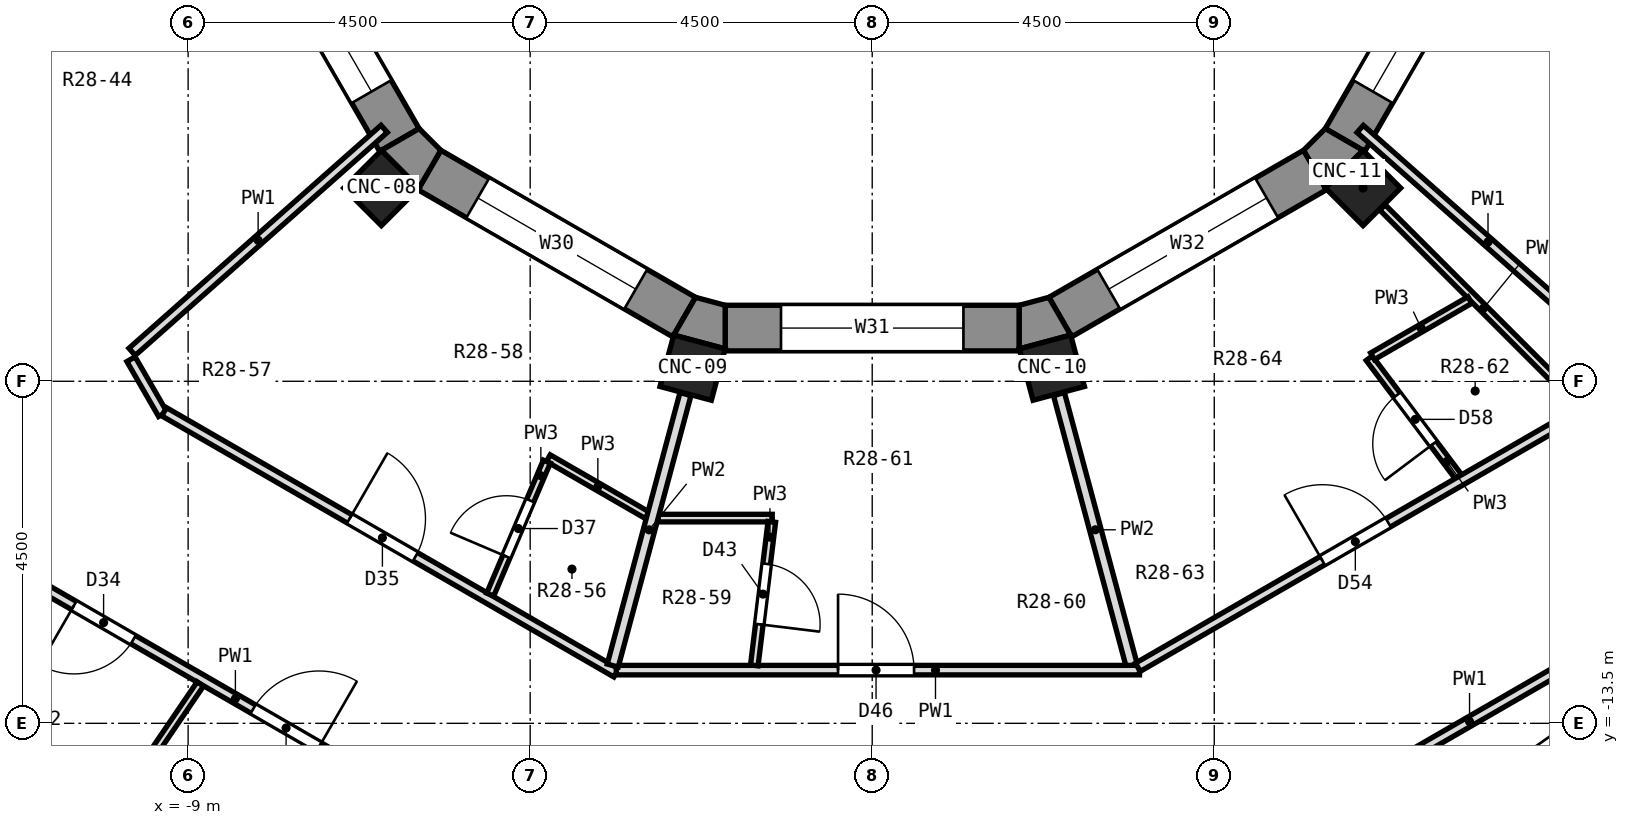
"""IFC4 building model, lengths in metres.
Left out: names, types, materials, properties, quantities, classifications, styles, units other than length and angle.
Written with IfcOpenShell. Run it as: python <this file> out.ifc"""

import sys

from ifc_helpers import new_model, si_unit, direction, frame, frame_2d, origin, origin_2d, place, context, subcontext, project, spatial, polyline, rectangle, outline, extrude, element, fill, save


model = new_model("IFC4")
c1 = context("Model", 3, precision=1e-05, world=origin(), true_north=direction((0.0, 1.0)))
c2 = subcontext(c1, "Body", "Model", "MODEL_VIEW")
j1 = project(units=[si_unit("LENGTHUNIT", "METRE"), si_unit("PLANEANGLEUNIT", "RADIAN")], contexts=[c1])
p1 = place(None, origin())
s1 = spatial("IfcSite", under=j1, at=p1, CompositionType="ELEMENT")
p2 = place(p1, origin())
s2 = spatial("IfcBuilding", under=s1, at=p2, CompositionType="ELEMENT")
p3 = place(p2, frame((0.0, 0.0, 190.5)))
s3 = spatial("IfcBuildingStorey", under=s2, at=p3, CompositionType="ELEMENT", Elevation=190.5)
for number, where, z_axis, x_axis in (
    (1, (-6.458, -6.458, 0.0), (0.0, 0.0, 1.0), (-0.707, -0.707, 0.0)),
    (2, (-2.364, -8.821, 0.0), (0.0, 0.0, 1.0), (-0.259, -0.966, 0.0)),
    (3, (2.364, -8.821, 0.0), (0.0, 0.0, 1.0), (0.259, -0.966, 0.0)),
    (4, (6.458, -6.458, 0.0), (0.0, 0.0, 1.0), (0.707, -0.707, 0.0)),
):
    element("IfcColumn", number, at=place(p3, frame(where, z_axis=z_axis, x_axis=x_axis)), inside=s3, PredefinedType="COLUMN", context=c2, shape_type="SweptSolid", body=[
        extrude(rectangle(XDim=0.7, YDim=0.7, at=origin_2d()), origin(), (0.0, 0.0, 1.0), 3.3),
    ])
p4 = place(p3, frame((-8.156, -2.474, 0.0), z_axis=(0.0, 0.0, 1.0), x_axis=(0.500033728941, -0.866005929495, 0.0)))
e5 = element("IfcWall", 5, at=p4, inside=s3, PredefinedType="SOLIDWALL", context=c2, shape_type="SweptSolid", body=[
    extrude(rectangle(XDim=3.87, YDim=0.6, at=frame_2d((1.935, 0.0))), origin(), (0.0, 0.0, 1.0), 2.85),
])
p5 = place(p4, frame((0.735, 0.0, 0.9)))
e6 = element("IfcOpeningElement", 6, at=p5, cuts=e5, PredefinedType="OPENING", context=c2, shape_type="SweptSolid", body=[
    extrude(rectangle(XDim=2.4, YDim=1.8, at=frame_2d((1.2, 0.9))), frame((0.0, 0.312, 0.0), z_axis=(0.0, -1.0, 0.0), x_axis=(1.0, 0.0, 0.0)), (0.0, 0.0, 1.0), 0.624),
])
p6 = place(p3, frame((-5.826, -6.22, 0.0), z_axis=(0.0, 0.0, 1.0), x_axis=(0.866005929495, -0.500033728941, 0.0)))
e7 = element("IfcWall", 7, at=p6, inside=s3, PredefinedType="SOLIDWALL", context=c2, shape_type="SweptSolid", body=[
    extrude(rectangle(XDim=3.87, YDim=0.6, at=frame_2d((1.935, 0.0))), origin(), (0.0, 0.0, 1.0), 2.85),
])
p7 = place(p6, frame((0.735, 0.0, 0.9)))
e8 = element("IfcOpeningElement", 8, at=p7, cuts=e7, PredefinedType="OPENING", context=c2, shape_type="SweptSolid", body=[
    extrude(rectangle(XDim=2.4, YDim=1.8, at=frame_2d((1.2, 0.9))), frame((0.0, 0.312, 0.0), z_axis=(0.0, -1.0, 0.0), x_axis=(1.0, 0.0, 0.0)), (0.0, 0.0, 1.0), 0.624),
])
p8 = place(p3, frame((-1.935, -8.3, 0.0), z_axis=(0.0, 0.0, 1.0), x_axis=(1.0, 0.0, 0.0)))
e9 = element("IfcWall", 9, at=p8, inside=s3, PredefinedType="SOLIDWALL", context=c2, shape_type="SweptSolid", body=[
    extrude(rectangle(XDim=3.87, YDim=0.6, at=frame_2d((1.935, 0.0))), origin(), (0.0, 0.0, 1.0), 2.85),
])
p9 = place(p8, frame((0.735, 0.0, 0.9)))
e10 = element("IfcOpeningElement", 10, at=p9, cuts=e9, PredefinedType="OPENING", context=c2, shape_type="SweptSolid", body=[
    extrude(rectangle(XDim=2.4, YDim=1.8, at=frame_2d((1.2, 0.9))), frame((0.0, 0.312, 0.0), z_axis=(0.0, -1.0, 0.0), x_axis=(1.0, 0.0, 0.0)), (0.0, 0.0, 1.0), 0.624),
])
p10 = place(p3, frame((2.474, -8.156, 0.0), z_axis=(0.0, 0.0, 1.0), x_axis=(0.866005929495, 0.500033728941, 0.0)))
e11 = element("IfcWall", 11, at=p10, inside=s3, PredefinedType="SOLIDWALL", context=c2, shape_type="SweptSolid", body=[
    extrude(rectangle(XDim=3.87, YDim=0.6, at=frame_2d((1.935, 0.0))), origin(), (0.0, 0.0, 1.0), 2.85),
])
p11 = place(p10, frame((0.735, 0.0, 0.9)))
e12 = element("IfcOpeningElement", 12, at=p11, cuts=e11, PredefinedType="OPENING", context=c2, shape_type="SweptSolid", body=[
    extrude(rectangle(XDim=2.4, YDim=1.8, at=frame_2d((1.2, 0.9))), frame((0.0, 0.312, 0.0), z_axis=(0.0, -1.0, 0.0), x_axis=(1.0, 0.0, 0.0)), (0.0, 0.0, 1.0), 0.624),
])
p12 = place(p3, frame((6.22, -5.826, 0.0), z_axis=(0.0, 0.0, 1.0), x_axis=(0.500033728941, 0.866005929495, 0.0)))
e13 = element("IfcWall", 13, at=p12, inside=s3, PredefinedType="SOLIDWALL", context=c2, shape_type="SweptSolid", body=[
    extrude(rectangle(XDim=3.87, YDim=0.6, at=frame_2d((1.935, 0.0))), origin(), (0.0, 0.0, 1.0), 2.85),
])
p13 = place(p12, frame((0.735, 0.0, 0.9)))
e14 = element("IfcOpeningElement", 14, at=p13, cuts=e13, PredefinedType="OPENING", context=c2, shape_type="SweptSolid", body=[
    extrude(rectangle(XDim=2.4, YDim=1.8, at=frame_2d((1.2, 0.9))), frame((0.0, 0.312, 0.0), z_axis=(0.0, -1.0, 0.0), x_axis=(1.0, 0.0, 0.0)), (0.0, 0.0, 1.0), 0.624),
])
p14 = place(p3, origin())
e15 = element("IfcWall", 15, at=p14, inside=s3, PredefinedType="SOLIDWALL", context=c2, shape_type="SweptSolid", body=[
    extrude(outline(polyline([(-6.458, -5.962), (-5.962, -6.458), (-5.676, -5.961), (-5.961, -5.676), (-6.458, -5.962)])), origin(), (0.0, 0.0, 1.0), 2.85),
])
p15 = place(p3, origin())
e16 = element("IfcWall", 16, at=p15, inside=s3, PredefinedType="SOLIDWALL", context=c2, shape_type="SweptSolid", body=[
    extrude(outline(polyline([(-1.935, -8.573), (-1.935, -8.0), (-2.324, -7.896), (-2.611, -8.392), (-1.935, -8.573)])), origin(), (0.0, 0.0, 1.0), 2.85),
])
p16 = place(p3, origin())
e17 = element("IfcWall", 17, at=p16, inside=s3, PredefinedType="SOLIDWALL", context=c2, shape_type="SweptSolid", body=[
    extrude(outline(polyline([(2.611, -8.392), (2.324, -7.896), (1.935, -8.0), (1.935, -8.573), (2.611, -8.392)])), origin(), (0.0, 0.0, 1.0), 2.85),
])
p17 = place(p3, origin())
e18 = element("IfcWall", 18, at=p17, inside=s3, PredefinedType="SOLIDWALL", context=c2, shape_type="SweptSolid", body=[
    extrude(outline(polyline([(5.962, -6.458), (6.458, -5.962), (5.961, -5.676), (5.676, -5.961), (5.962, -6.458)])), origin(), (0.0, 0.0, 1.0), 2.85),
])
p18 = place(p3, frame((2.457, -9.169, 0.0), z_axis=(0.0, 0.0, 1.0), x_axis=(0.258879127767, -0.965909725185, 0.0)))
e19 = element("IfcWall", 19, at=p18, inside=s3, PredefinedType="PARTITIONING", context=c2, shape_type="SweptSolid", body=[
    extrude(rectangle(XDim=3.697, YDim=0.15, at=frame_2d((1.848, 0.0))), origin(), (0.0, 0.0, 1.0), 2.85),
])
p19 = place(p3, frame((-9.752, -8.709, 0.0), z_axis=(0.0, 0.0, 1.0), x_axis=(0.500194796412, -0.865912908809, 0.0)))
e20 = element("IfcWall", 20, at=p19, inside=s3, PredefinedType="PARTITIONING", context=c2, shape_type="SweptSolid", body=[
    extrude(rectangle(XDim=0.835, YDim=0.125, at=frame_2d((0.417, 0.0))), origin(), (0.0, 0.0, 1.0), 2.85),
])
p20 = place(p3, frame((6.539, -8.696, 0.0), z_axis=(0.0, 0.0, 1.0), x_axis=(0.601120334692, -0.799158521959, 0.0)))
e21 = element("IfcWall", 21, at=p20, inside=s3, PredefinedType="PARTITIONING", context=c2, shape_type="SweptSolid", body=[
    extrude(rectangle(XDim=1.951, YDim=0.1, at=frame_2d((0.976, 0.0))), origin(), (0.0, 0.0, 1.0), 2.85),
])
p21 = place(p20, frame((0.607, 0.0, 0.0)))
e22 = element("IfcOpeningElement", 22, at=p21, cuts=e21, PredefinedType="OPENING", context=c2, shape_type="SweptSolid", body=[
    extrude(rectangle(XDim=0.8, YDim=2.1, at=frame_2d((0.4, 1.05))), frame((0.0, 0.062, 0.0), z_axis=(0.0, -1.0, 0.0), x_axis=(1.0, 0.0, 0.0)), (0.0, 0.0, 1.0), 0.124),
])
p22 = place(p3, frame((6.712, -6.712, 0.0), z_axis=(0.0, 0.0, 1.0), x_axis=(0.707106781187, -0.707106781187, 0.0)))
e23 = element("IfcWall", 23, at=p22, inside=s3, PredefinedType="PARTITIONING", context=c2, shape_type="SweptSolid", body=[
    extrude(rectangle(XDim=3.759, YDim=0.1, at=frame_2d((1.88, 0.0))), origin(), (0.0, 0.0, 1.0), 2.85),
])
p23 = place(p3, frame((6.42, -5.68, 0.0), z_axis=(0.0, 0.0, 1.0), x_axis=(0.748958163245, -0.662617287511, 0.0)))
e24 = element("IfcWall", 24, at=p23, inside=s3, PredefinedType="PARTITIONING", context=c2, shape_type="SweptSolid", body=[
    extrude(rectangle(XDim=4.49, YDim=0.125, at=frame_2d((2.245, 0.0))), origin(), (0.0, 0.0, 1.0), 2.85),
])
p24 = place(p3, frame((-11.366, -11.451, 0.0), z_axis=(0.0, 0.0, 1.0), x_axis=(0.866032091518, -0.499988416326, 0.0)))
e25 = element("IfcWall", 25, at=p24, inside=s3, PredefinedType="PARTITIONING", context=c2, shape_type="SweptSolid", body=[
    extrude(rectangle(XDim=8.37, YDim=0.125, at=frame_2d((4.185, 0.0))), origin(), (0.0, 0.0, 1.0), 2.85),
])
p25 = place(p24, frame((0.998, 0.0, 0.0)))
e26 = element("IfcOpeningElement", 26, at=p25, cuts=e25, PredefinedType="OPENING", context=c2, shape_type="SweptSolid", body=[
    extrude(rectangle(XDim=0.9, YDim=2.1, at=frame_2d((0.45, 1.05))), frame((0.0, 0.074, 0.0), z_axis=(0.0, -1.0, 0.0), x_axis=(1.0, 0.0, 0.0)), (0.0, 0.0, 1.0), 0.149),
])
p26 = place(p24, frame((3.72, 0.0, 0.0)))
e27 = element("IfcOpeningElement", 27, at=p26, cuts=e25, PredefinedType="OPENING", context=c2, shape_type="SweptSolid", body=[
    extrude(rectangle(XDim=1.0, YDim=2.1, at=frame_2d((0.5, 1.05))), frame((0.0, 0.074, 0.0), z_axis=(0.0, -1.0, 0.0), x_axis=(1.0, 0.0, 0.0)), (0.0, 0.0, 1.0), 0.149),
])
p27 = place(p3, frame((-9.316, -9.401, 0.0), z_axis=(0.0, 0.0, 1.0), x_axis=(0.865996765544, -0.500049599607, 0.0)))
e28 = element("IfcWall", 28, at=p27, inside=s3, PredefinedType="PARTITIONING", context=c2, shape_type="SweptSolid", body=[
    extrude(rectangle(XDim=6.869, YDim=0.125, at=frame_2d((3.435, 0.0))), origin(), (0.0, 0.0, 1.0), 2.85),
])
p28 = place(p27, frame((2.816, 0.0, 0.0)))
e29 = element("IfcOpeningElement", 29, at=p28, cuts=e28, PredefinedType="OPENING", context=c2, shape_type="SweptSolid", body=[
    extrude(rectangle(XDim=1.0, YDim=2.1, at=frame_2d((0.5, 1.05))), frame((0.0, 0.074, 0.0), z_axis=(0.0, -1.0, 0.0), x_axis=(1.0, 0.0, 0.0)), (0.0, 0.0, 1.0), 0.149),
])
p29 = place(p3, frame((-4.261, -10.011, 0.0), z_axis=(0.0, 0.0, 1.0), x_axis=(0.86609634961, -0.499877098087, 0.0)))
e30 = element("IfcWall", 30, at=p29, inside=s3, PredefinedType="PARTITIONING", context=c2, shape_type="SweptSolid", body=[
    extrude(rectangle(XDim=1.503, YDim=0.1, at=frame_2d((0.752, 0.0))), origin(), (0.0, 0.0, 1.0), 2.85),
])
p30 = place(p3, frame((-3.367, -12.8, 0.0), z_axis=(0.0, 0.0, 1.0), x_axis=(1.0, 0.0, 0.0)))
e31 = element("IfcWall", 31, at=p30, inside=s3, PredefinedType="PARTITIONING", context=c2, shape_type="SweptSolid", body=[
    extrude(rectangle(XDim=6.884, YDim=0.125, at=frame_2d((3.442, 0.0))), origin(), (0.0, 0.0, 1.0), 2.85),
])
p31 = place(p30, frame((2.918, 0.0, 0.0)))
e32 = element("IfcOpeningElement", 32, at=p31, cuts=e31, PredefinedType="OPENING", context=c2, shape_type="SweptSolid", body=[
    extrude(rectangle(XDim=1.0, YDim=2.1, at=frame_2d((0.5, 1.05))), frame((0.0, 0.074, 0.0), z_axis=(0.0, -1.0, 0.0), x_axis=(1.0, 0.0, 0.0)), (0.0, 0.0, 1.0), 0.149),
])
p32 = place(p3, frame((-2.819, -10.8, 0.0), z_axis=(0.0, 0.0, 1.0), x_axis=(1.0, 0.0, 0.0)))
e33 = element("IfcWall", 33, at=p32, inside=s3, PredefinedType="PARTITIONING", context=c2, shape_type="SweptSolid", body=[
    extrude(rectangle(XDim=1.504, YDim=0.1, at=frame_2d((0.752, 0.0))), origin(), (0.0, 0.0, 1.0), 2.85),
])
p33 = place(p3, frame((4.234, -15.569, 0.0), z_axis=(0.0, 0.0, 1.0), x_axis=(0.866024799292, 0.50000104701, 0.0)))
e34 = element("IfcWall", 34, at=p33, inside=s3, PredefinedType="PARTITIONING", context=c2, shape_type="SweptSolid", body=[
    extrude(rectangle(XDim=8.37, YDim=0.125, at=frame_2d((4.185, 0.0))), origin(), (0.0, 0.0, 1.0), 2.85),
])
p34 = place(p3, frame((3.495, -12.762, 0.0), z_axis=(0.0, 0.0, 1.0), x_axis=(0.865996609613, 0.500049869652, 0.0)))
e35 = element("IfcWall", 35, at=p34, inside=s3, PredefinedType="PARTITIONING", context=c2, shape_type="SweptSolid", body=[
    extrude(rectangle(XDim=6.734, YDim=0.125, at=frame_2d((3.367, 0.0))), origin(), (0.0, 0.0, 1.0), 2.85),
])
p35 = place(p34, frame((2.804, 0.0, 0.0)))
e36 = element("IfcOpeningElement", 36, at=p35, cuts=e35, PredefinedType="OPENING", context=c2, shape_type="SweptSolid", body=[
    extrude(rectangle(XDim=1.0, YDim=2.1, at=frame_2d((0.5, 1.05))), frame((0.0, 0.074, 0.0), z_axis=(0.0, -1.0, 0.0), x_axis=(1.0, 0.0, 0.0)), (0.0, 0.0, 1.0), 0.149),
])
p36 = place(p3, frame((6.582, -8.671, 0.0), z_axis=(0.0, 0.0, 1.0), x_axis=(0.86582534463, 0.500346352636, 0.0)))
e37 = element("IfcWall", 37, at=p36, inside=s3, PredefinedType="PARTITIONING", context=c2, shape_type="SweptSolid", body=[
    extrude(rectangle(XDim=1.479, YDim=0.1, at=frame_2d((0.74, 0.0))), origin(), (0.0, 0.0, 1.0), 2.85),
])
p37 = place(p3, frame((-9.737, -8.613, 0.0), z_axis=(0.0, 0.0, 1.0), x_axis=(0.748961830347, 0.662613142552, 0.0)))
e38 = element("IfcWall", 38, at=p37, inside=s3, PredefinedType="PARTITIONING", context=c2, shape_type="SweptSolid", body=[
    extrude(rectangle(XDim=4.428, YDim=0.125, at=frame_2d((2.214, 0.0))), origin(), (0.0, 0.0, 1.0), 2.85),
])
p38 = place(p3, frame((-10.754, -15.794, 0.0), z_axis=(0.0, 0.0, 1.0), x_axis=(0.562822277652, 0.826577935695, 0.0)))
e39 = element("IfcWall", 39, at=p38, inside=s3, PredefinedType="PARTITIONING", context=c2, shape_type="SweptSolid", body=[
    extrude(rectangle(XDim=3.402, YDim=0.1, at=frame_2d((1.701, 0.0))), origin(), (0.0, 0.0, 1.0), 2.85),
])
p39 = place(p3, frame((-5.026, -11.806, 0.0), z_axis=(0.0, 0.0, 1.0), x_axis=(0.391841940262, 0.920032550431, 0.0)))
e40 = element("IfcWall", 40, at=p39, inside=s3, PredefinedType="PARTITIONING", context=c2, shape_type="SweptSolid", body=[
    extrude(rectangle(XDim=1.902, YDim=0.1, at=frame_2d((0.951, 0.0))), origin(), (0.0, 0.0, 1.0), 2.85),
])
p40 = place(p39, frame((0.544, 0.0, 0.0)))
e41 = element("IfcOpeningElement", 41, at=p40, cuts=e40, PredefinedType="OPENING", context=c2, shape_type="SweptSolid", body=[
    extrude(rectangle(XDim=0.8, YDim=2.1, at=frame_2d((0.4, 1.05))), frame((0.0, 0.062, 0.0), z_axis=(0.0, -1.0, 0.0), x_axis=(1.0, 0.0, 0.0)), (0.0, 0.0, 1.0), 0.124),
])
p41 = place(p3, frame((-3.414, -12.74, 0.0), z_axis=(0.0, 0.0, 1.0), x_axis=(0.258739386172, 0.965947167315, 0.0)))
e42 = element("IfcWall", 42, at=p41, inside=s3, PredefinedType="PARTITIONING", context=c2, shape_type="SweptSolid", body=[
    extrude(rectangle(XDim=3.697, YDim=0.15, at=frame_2d((1.849, 0.0))), origin(), (0.0, 0.0, 1.0), 2.85),
])
p42 = place(p3, frame((-1.552, -12.738, 0.0), z_axis=(0.0, 0.0, 1.0), x_axis=(0.121143814879, 0.992634966197, 0.0)))
e43 = element("IfcWall", 43, at=p42, inside=s3, PredefinedType="PARTITIONING", context=c2, shape_type="SweptSolid", body=[
    extrude(rectangle(XDim=1.902, YDim=0.1, at=frame_2d((0.951, 0.0))), origin(), (0.0, 0.0, 1.0), 2.85),
])
p43 = place(p42, frame((0.545, 0.0, 0.0)))
e44 = element("IfcOpeningElement", 44, at=p43, cuts=e43, PredefinedType="OPENING", context=c2, shape_type="SweptSolid", body=[
    extrude(rectangle(XDim=0.8, YDim=2.1, at=frame_2d((0.4, 1.05))), frame((0.0, 0.062, 0.0), z_axis=(0.0, -1.0, 0.0), x_axis=(1.0, 0.0, 0.0)), (0.0, 0.0, 1.0), 0.124),
])
p44 = place(p5, origin())
e45 = element("IfcWindow", 45, at=p44, inside=s3, PartitioningType="SINGLE_PANEL", PredefinedType="WINDOW", context=c2, shape_type="SweptSolid", body=[
    extrude(rectangle(XDim=2.4, YDim=1.8, at=frame_2d((1.2, 0.9))), frame((0.0, -0.12, 0.0), z_axis=(0.0, -1.0, 0.0), x_axis=(1.0, 0.0, 0.0)), (0.0, 0.0, 1.0), 0.06),
])
fill(e6, e45)
p45 = place(p7, origin())
e46 = element("IfcWindow", 46, at=p45, inside=s3, PartitioningType="SINGLE_PANEL", PredefinedType="WINDOW", context=c2, shape_type="SweptSolid", body=[
    extrude(rectangle(XDim=2.4, YDim=1.8, at=frame_2d((1.2, 0.9))), frame((0.0, -0.12, 0.0), z_axis=(0.0, -1.0, 0.0), x_axis=(1.0, 0.0, 0.0)), (0.0, 0.0, 1.0), 0.06),
])
fill(e8, e46)
p46 = place(p9, origin())
e47 = element("IfcWindow", 47, at=p46, inside=s3, PartitioningType="SINGLE_PANEL", PredefinedType="WINDOW", context=c2, shape_type="SweptSolid", body=[
    extrude(rectangle(XDim=2.4, YDim=1.8, at=frame_2d((1.2, 0.9))), frame((0.0, -0.12, 0.0), z_axis=(0.0, -1.0, 0.0), x_axis=(1.0, 0.0, 0.0)), (0.0, 0.0, 1.0), 0.06),
])
fill(e10, e47)
p47 = place(p11, origin())
e48 = element("IfcWindow", 48, at=p47, inside=s3, PartitioningType="SINGLE_PANEL", PredefinedType="WINDOW", context=c2, shape_type="SweptSolid", body=[
    extrude(rectangle(XDim=2.4, YDim=1.8, at=frame_2d((1.2, 0.9))), frame((0.0, -0.12, 0.0), z_axis=(0.0, -1.0, 0.0), x_axis=(1.0, 0.0, 0.0)), (0.0, 0.0, 1.0), 0.06),
])
fill(e12, e48)
p48 = place(p13, origin())
e49 = element("IfcWindow", 49, at=p48, inside=s3, PartitioningType="SINGLE_PANEL", PredefinedType="WINDOW", context=c2, shape_type="SweptSolid", body=[
    extrude(rectangle(XDim=2.4, YDim=1.8, at=frame_2d((1.2, 0.9))), frame((0.0, -0.12, 0.0), z_axis=(0.0, -1.0, 0.0), x_axis=(1.0, 0.0, 0.0)), (0.0, 0.0, 1.0), 0.06),
])
fill(e14, e49)
p49 = place(p25, frame((0.9, 0.0, 0.0), z_axis=(0.0, 0.0, 1.0), x_axis=(-1.0, 0.0, 0.0)))
e50 = element("IfcDoor", 50, at=p49, inside=s3, OperationType="SINGLE_SWING_RIGHT", PredefinedType="DOOR", context=c2, shape_type="SweptSolid", body=[
    extrude(rectangle(XDim=0.9, YDim=2.1, at=frame_2d((0.45, 1.05))), frame((0.0, 0.025, 0.0), z_axis=(0.0, -1.0, 0.0), x_axis=(1.0, 0.0, 0.0)), (0.0, 0.0, 1.0), 0.05),
])
fill(e26, e50)
p50 = place(p28, origin())
e51 = element("IfcDoor", 51, at=p50, inside=s3, OperationType="SINGLE_SWING_LEFT", PredefinedType="DOOR", context=c2, shape_type="SweptSolid", body=[
    extrude(rectangle(XDim=1.0, YDim=2.1, at=frame_2d((0.5, 1.05))), frame((0.0, 0.025, 0.0), z_axis=(0.0, -1.0, 0.0), x_axis=(1.0, 0.0, 0.0)), (0.0, 0.0, 1.0), 0.05),
])
fill(e29, e51)
p51 = place(p26, origin())
e52 = element("IfcDoor", 52, at=p51, inside=s3, OperationType="SINGLE_SWING_RIGHT", PredefinedType="DOOR", context=c2, shape_type="SweptSolid", body=[
    extrude(rectangle(XDim=1.0, YDim=2.1, at=frame_2d((0.5, 1.05))), frame((0.0, 0.025, 0.0), z_axis=(0.0, -1.0, 0.0), x_axis=(1.0, 0.0, 0.0)), (0.0, 0.0, 1.0), 0.05),
])
fill(e27, e52)
p52 = place(p40, origin())
e53 = element("IfcDoor", 53, at=p52, inside=s3, OperationType="SINGLE_SWING_LEFT", PredefinedType="DOOR", context=c2, shape_type="SweptSolid", body=[
    extrude(rectangle(XDim=0.8, YDim=2.1, at=frame_2d((0.4, 1.05))), frame((0.0, 0.025, 0.0), z_axis=(0.0, -1.0, 0.0), x_axis=(1.0, 0.0, 0.0)), (0.0, 0.0, 1.0), 0.05),
])
fill(e41, e53)
p53 = place(p43, frame((0.8, 0.0, 0.0), z_axis=(0.0, 0.0, 1.0), x_axis=(-1.0, 0.0, 0.0)))
e54 = element("IfcDoor", 54, at=p53, inside=s3, OperationType="SINGLE_SWING_RIGHT", PredefinedType="DOOR", context=c2, shape_type="SweptSolid", body=[
    extrude(rectangle(XDim=0.8, YDim=2.1, at=frame_2d((0.4, 1.05))), frame((0.0, 0.025, 0.0), z_axis=(0.0, -1.0, 0.0), x_axis=(1.0, 0.0, 0.0)), (0.0, 0.0, 1.0), 0.05),
])
fill(e44, e54)
p54 = place(p31, origin())
e55 = element("IfcDoor", 55, at=p54, inside=s3, OperationType="SINGLE_SWING_LEFT", PredefinedType="DOOR", context=c2, shape_type="SweptSolid", body=[
    extrude(rectangle(XDim=1.0, YDim=2.1, at=frame_2d((0.5, 1.05))), frame((0.0, 0.025, 0.0), z_axis=(0.0, -1.0, 0.0), x_axis=(1.0, 0.0, 0.0)), (0.0, 0.0, 1.0), 0.05),
])
fill(e32, e55)
p55 = place(p35, origin())
e56 = element("IfcDoor", 56, at=p55, inside=s3, OperationType="SINGLE_SWING_LEFT", PredefinedType="DOOR", context=c2, shape_type="SweptSolid", body=[
    extrude(rectangle(XDim=1.0, YDim=2.1, at=frame_2d((0.5, 1.05))), frame((0.0, 0.025, 0.0), z_axis=(0.0, -1.0, 0.0), x_axis=(1.0, 0.0, 0.0)), (0.0, 0.0, 1.0), 0.05),
])
fill(e36, e56)
p56 = place(p21, frame((0.8, 0.0, 0.0), z_axis=(0.0, 0.0, 1.0), x_axis=(-1.0, 0.0, 0.0)))
e57 = element("IfcDoor", 57, at=p56, inside=s3, OperationType="SINGLE_SWING_LEFT", PredefinedType="DOOR", context=c2, shape_type="SweptSolid", body=[
    extrude(rectangle(XDim=0.8, YDim=2.1, at=frame_2d((0.4, 1.05))), frame((0.0, 0.025, 0.0), z_axis=(0.0, -1.0, 0.0), x_axis=(1.0, 0.0, 0.0)), (0.0, 0.0, 1.0), 0.05),
])
fill(e22, e57)
save(model, sys.argv[1])
